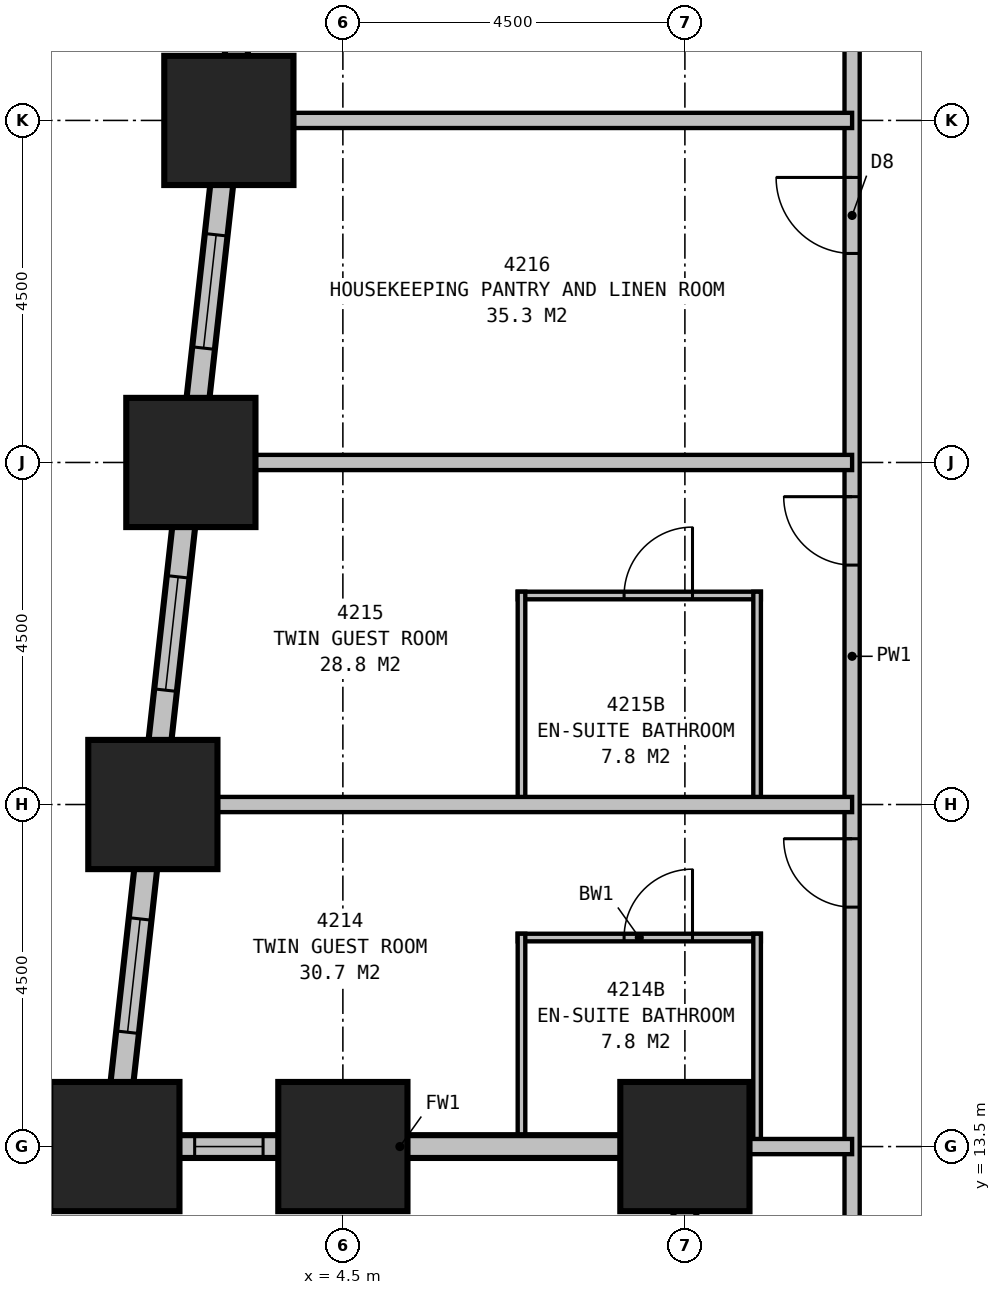
"""IFC4 building model, lengths in metres.
Left out: names, types, materials, properties, quantities, classifications, styles, units other than length and angle.
Written with IfcOpenShell. Run it as: python <this file> out.ifc"""

import sys

from ifc_helpers import new_model, si_unit, direction, frame, frame_2d, origin, origin_2d, place, context, subcontext, project, spatial, rectangle, extrude, element, fill, save


model = new_model("IFC4")
c1 = context("Model", 3, precision=1e-05, world=origin(), true_north=direction((0.0, 1.0)))
c2 = subcontext(c1, "Body", "Model", "MODEL_VIEW")
j1 = project(units=[si_unit("LENGTHUNIT", "METRE"), si_unit("PLANEANGLEUNIT", "RADIAN")], contexts=[c1])
p1 = place(None, origin())
s1 = spatial("IfcSite", under=j1, at=p1, CompositionType="ELEMENT")
p2 = place(p1, origin())
s2 = spatial("IfcBuilding", under=s1, at=p2, CompositionType="ELEMENT")
p3 = place(p2, frame((0.0, 0.0, 165.9)))
s3 = spatial("IfcBuildingStorey", under=s2, at=p3, CompositionType="ELEMENT", Elevation=165.9)
for number, where, z_axis, x_axis in (
    (1, (1.5, 13.5, 0.0), (0.0, 0.0, 1.0), (1.0, 0.0, 0.0)),
    (2, (4.5, 13.5, 0.0), (0.0, 0.0, 1.0), (1.0, 0.0, 0.0)),
    (3, (9.0, 13.5, 0.0), (0.0, 0.0, 1.0), (1.0, 0.0, 0.0)),
    (4, (3.0, 27.0, 0.0), (0.0, 0.0, 1.0), (1.0, 0.0, 0.0)),
    (5, (2.5, 22.5, 0.0), (0.0, 0.0, 1.0), (1.0, 0.0, 0.0)),
    (6, (2.0, 18.0, 0.0), (0.0, 0.0, 1.0), (1.0, 0.0, 0.0)),
):
    element("IfcColumn", number, at=place(p3, frame(where, z_axis=z_axis, x_axis=x_axis)), inside=s3, PredefinedType="COLUMN", context=c2, shape_type="SweptSolid", body=[
        extrude(rectangle(XDim=1.7, YDim=1.7, at=origin_2d()), origin(), (0.0, 0.0, 1.0), 3.5),
    ])
p4 = place(p3, frame((1.35, 13.5, 0.0), z_axis=(0.0, 0.0, 1.0), x_axis=(1.0, 0.0, 0.0)))
e7 = element("IfcWall", 7, at=p4, inside=s3, PredefinedType="STANDARD", context=c2, shape_type="SweptSolid", body=[
    extrude(rectangle(XDim=7.8, YDim=0.3, at=frame_2d((3.9, 0.0))), origin(), (0.0, 0.0, 1.0), 2.15),
])
p5 = place(p4, frame((1.2, 0.0, 0.5)))
e8 = element("IfcOpeningElement", 8, at=p5, cuts=e7, PredefinedType="OPENING", context=c2, shape_type="SweptSolid", body=[
    extrude(rectangle(XDim=0.9, YDim=1.5, at=frame_2d((0.45, 0.75))), frame((0.0, 0.16, 0.0), z_axis=(0.0, -1.0, 0.0), x_axis=(1.0, 0.0, 0.0)), (0.0, 0.0, 1.0), 0.32),
])
p6 = place(p3, frame((9.0, 13.65, 0.0), z_axis=(0.0, 0.0, 1.0), x_axis=(0.0, -1.0, 0.0)))
e9 = element("IfcWall", 9, at=p6, inside=s3, PredefinedType="STANDARD", context=c2, shape_type="SweptSolid", body=[
    extrude(rectangle(XDim=13.8, YDim=0.3, at=frame_2d((6.9, 0.0))), origin(), (0.0, 0.0, 1.0), 2.15),
])
p7 = place(p6, frame((1.2, 0.0, 0.5)))
e10 = element("IfcOpeningElement", 10, at=p7, cuts=e9, PredefinedType="OPENING", context=c2, shape_type="SweptSolid", body=[
    extrude(rectangle(XDim=2.4, YDim=1.5, at=frame_2d((1.2, 0.75))), frame((0.0, 0.16, 0.0), z_axis=(0.0, -1.0, 0.0), x_axis=(1.0, 0.0, 0.0)), (0.0, 0.0, 1.0), 0.32),
])
p8 = place(p6, frame((5.7, 0.0, 0.5)))
e11 = element("IfcOpeningElement", 11, at=p8, cuts=e9, PredefinedType="OPENING", context=c2, shape_type="SweptSolid", body=[
    extrude(rectangle(XDim=2.4, YDim=1.5, at=frame_2d((1.2, 0.75))), frame((0.0, 0.16, 0.0), z_axis=(0.0, -1.0, 0.0), x_axis=(1.0, 0.0, 0.0)), (0.0, 0.0, 1.0), 0.32),
])
p9 = place(p6, frame((10.2, 0.0, 0.5)))
e12 = element("IfcOpeningElement", 12, at=p9, cuts=e9, PredefinedType="OPENING", context=c2, shape_type="SweptSolid", body=[
    extrude(rectangle(XDim=2.4, YDim=1.5, at=frame_2d((1.2, 0.75))), frame((0.0, 0.16, 0.0), z_axis=(0.0, -1.0, 0.0), x_axis=(1.0, 0.0, 0.0)), (0.0, 0.0, 1.0), 0.32),
])
p10 = place(p3, frame((4.017, 36.149, 0.0), z_axis=(0.0, 0.0, 1.0), x_axis=(-0.110433862387, -0.993883475081, 0.0)))
e13 = element("IfcWall", 13, at=p10, inside=s3, PredefinedType="STANDARD", context=c2, shape_type="SweptSolid", body=[
    extrude(rectangle(XDim=22.939, YDim=0.3, at=frame_2d((11.469, 0.0))), origin(), (0.0, 0.0, 1.0), 2.25),
])
p11 = place(p10, frame((1.664, 0.0, 0.5)))
e14 = element("IfcOpeningElement", 14, at=p11, cuts=e13, PredefinedType="OPENING", context=c2, shape_type="SweptSolid", body=[
    extrude(rectangle(XDim=1.5, YDim=1.6, at=frame_2d((0.75, 0.8))), frame((0.0, 0.16, 0.0), z_axis=(0.0, -1.0, 0.0), x_axis=(1.0, 0.0, 0.0)), (0.0, 0.0, 1.0), 0.32),
])
p12 = place(p10, frame((6.192, 0.0, 0.5)))
e15 = element("IfcOpeningElement", 15, at=p12, cuts=e13, PredefinedType="OPENING", context=c2, shape_type="SweptSolid", body=[
    extrude(rectangle(XDim=1.5, YDim=1.6, at=frame_2d((0.75, 0.8))), frame((0.0, 0.16, 0.0), z_axis=(0.0, -1.0, 0.0), x_axis=(1.0, 0.0, 0.0)), (0.0, 0.0, 1.0), 0.32),
])
p13 = place(p10, frame((10.719, 0.0, 0.5)))
e16 = element("IfcOpeningElement", 16, at=p13, cuts=e13, PredefinedType="OPENING", context=c2, shape_type="SweptSolid", body=[
    extrude(rectangle(XDim=1.5, YDim=1.6, at=frame_2d((0.75, 0.8))), frame((0.0, 0.16, 0.0), z_axis=(0.0, -1.0, 0.0), x_axis=(1.0, 0.0, 0.0)), (0.0, 0.0, 1.0), 0.32),
])
p14 = place(p10, frame((15.247, 0.0, 0.5)))
e17 = element("IfcOpeningElement", 17, at=p14, cuts=e13, PredefinedType="OPENING", context=c2, shape_type="SweptSolid", body=[
    extrude(rectangle(XDim=1.5, YDim=1.6, at=frame_2d((0.75, 0.8))), frame((0.0, 0.16, 0.0), z_axis=(0.0, -1.0, 0.0), x_axis=(1.0, 0.0, 0.0)), (0.0, 0.0, 1.0), 0.32),
])
p15 = place(p10, frame((19.775, 0.0, 0.5)))
e18 = element("IfcOpeningElement", 18, at=p15, cuts=e13, PredefinedType="OPENING", context=c2, shape_type="SweptSolid", body=[
    extrude(rectangle(XDim=1.5, YDim=1.6, at=frame_2d((0.75, 0.8))), frame((0.0, 0.16, 0.0), z_axis=(0.0, -1.0, 0.0), x_axis=(1.0, 0.0, 0.0)), (0.0, 0.0, 1.0), 0.32),
])
p16 = place(p3, frame((11.2, 10.6, 0.0), z_axis=(0.0, 0.0, 1.0), x_axis=(0.0, 1.0, 0.0)))
e19 = element("IfcWall", 19, at=p16, inside=s3, PredefinedType="PARTITIONING", context=c2, shape_type="SweptSolid", body=[
    extrude(rectangle(XDim=18.7, YDim=0.2, at=frame_2d((9.35, 0.0))), origin(), (0.0, 0.0, 1.0), 3.25),
])
p17 = place(p16, frame((6.05, 0.0, 0.0)))
e20 = element("IfcOpeningElement", 20, at=p17, cuts=e19, PredefinedType="OPENING", context=c2, shape_type="SweptSolid", body=[
    extrude(rectangle(XDim=0.9, YDim=2.1, at=frame_2d((0.45, 1.05))), frame((0.0, 0.11, 0.0), z_axis=(0.0, -1.0, 0.0), x_axis=(1.0, 0.0, 0.0)), (0.0, 0.0, 1.0), 0.22),
])
p18 = place(p16, frame((10.55, 0.0, 0.0)))
e21 = element("IfcOpeningElement", 21, at=p18, cuts=e19, PredefinedType="OPENING", context=c2, shape_type="SweptSolid", body=[
    extrude(rectangle(XDim=0.9, YDim=2.1, at=frame_2d((0.45, 1.05))), frame((0.0, 0.11, 0.0), z_axis=(0.0, -1.0, 0.0), x_axis=(1.0, 0.0, 0.0)), (0.0, 0.0, 1.0), 0.22),
])
p19 = place(p16, frame((14.65, 0.0, 0.0)))
e22 = element("IfcOpeningElement", 22, at=p19, cuts=e19, PredefinedType="OPENING", context=c2, shape_type="SweptSolid", body=[
    extrude(rectangle(XDim=1.0, YDim=2.1, at=frame_2d((0.5, 1.05))), frame((0.0, 0.11, 0.0), z_axis=(0.0, -1.0, 0.0), x_axis=(1.0, 0.0, 0.0)), (0.0, 0.0, 1.0), 0.22),
])
p20 = place(p3, frame((11.2, 18.0, 0.0), z_axis=(0.0, 0.0, 1.0), x_axis=(-1.0, 0.0, 0.0)))
e23 = element("IfcWall", 23, at=p20, inside=s3, PredefinedType="PARTITIONING", context=c2, shape_type="SweptSolid", body=[
    extrude(rectangle(XDim=9.199, YDim=0.2, at=frame_2d((4.6, 0.0))), origin(), (0.0, 0.0, 1.0), 2.25),
])
p21 = place(p3, frame((11.2, 22.5, 0.0), z_axis=(0.0, 0.0, 1.0), x_axis=(-1.0, 0.0, 0.0)))
e24 = element("IfcWall", 24, at=p21, inside=s3, PredefinedType="PARTITIONING", context=c2, shape_type="SweptSolid", body=[
    extrude(rectangle(XDim=8.699, YDim=0.2, at=frame_2d((4.35, 0.0))), origin(), (0.0, 0.0, 1.0), 2.25),
])
for number, where, z_axis, x_axis in (
    (25, (9.95, 13.5, 0.0), (0.0, 0.0, 1.0), (0.0, 1.0, 0.0)),
    (26, (6.85, 13.5, 0.0), (0.0, 0.0, 1.0), (0.0, 1.0, 0.0)),
):
    element("IfcWall", number, at=place(p3, frame(where, z_axis=z_axis, x_axis=x_axis)), inside=s3, PredefinedType="PLUMBINGWALL", context=c2, shape_type="SweptSolid", body=[
        extrude(rectangle(XDim=2.8, YDim=0.1, at=frame_2d((1.4, 0.0))), origin(), (0.0, 0.0, 1.0), 3.25),
    ])
p22 = place(p3, frame((10.0, 16.25, 0.0), z_axis=(0.0, 0.0, 1.0), x_axis=(-1.0, 0.0, 0.0)))
e27 = element("IfcWall", 27, at=p22, inside=s3, PredefinedType="PLUMBINGWALL", context=c2, shape_type="SweptSolid", body=[
    extrude(rectangle(XDim=3.2, YDim=0.1, at=frame_2d((1.6, 0.0))), origin(), (0.0, 0.0, 1.0), 3.25),
])
p23 = place(p22, frame((1.8, 0.0, 0.0), z_axis=(0.0, 0.0, 1.0), x_axis=(-1.0, 0.0, 0.0)))
e28 = element("IfcOpeningElement", 28, at=p23, cuts=e27, PredefinedType="OPENING", context=c2, shape_type="SweptSolid", body=[
    extrude(rectangle(XDim=0.9, YDim=2.1, at=frame_2d((0.45, 1.05))), frame((0.0, 0.06, 0.0), z_axis=(0.0, -1.0, 0.0), x_axis=(1.0, 0.0, 0.0)), (0.0, 0.0, 1.0), 0.12),
])
for number, where, z_axis, x_axis in (
    (29, (9.95, 18.0, 0.0), (0.0, 0.0, 1.0), (0.0, 1.0, 0.0)),
    (30, (6.85, 18.0, 0.0), (0.0, 0.0, 1.0), (0.0, 1.0, 0.0)),
):
    element("IfcWall", number, at=place(p3, frame(where, z_axis=z_axis, x_axis=x_axis)), inside=s3, PredefinedType="PLUMBINGWALL", context=c2, shape_type="SweptSolid", body=[
        extrude(rectangle(XDim=2.8, YDim=0.1, at=frame_2d((1.4, 0.0))), origin(), (0.0, 0.0, 1.0), 3.25),
    ])
p24 = place(p3, frame((10.0, 20.75, 0.0), z_axis=(0.0, 0.0, 1.0), x_axis=(-1.0, 0.0, 0.0)))
e31 = element("IfcWall", 31, at=p24, inside=s3, PredefinedType="PLUMBINGWALL", context=c2, shape_type="SweptSolid", body=[
    extrude(rectangle(XDim=3.2, YDim=0.1, at=frame_2d((1.6, 0.0))), origin(), (0.0, 0.0, 1.0), 3.25),
])
p25 = place(p24, frame((1.8, 0.0, 0.0), z_axis=(0.0, 0.0, 1.0), x_axis=(-1.0, 0.0, 0.0)))
e32 = element("IfcOpeningElement", 32, at=p25, cuts=e31, PredefinedType="OPENING", context=c2, shape_type="SweptSolid", body=[
    extrude(rectangle(XDim=0.9, YDim=2.1, at=frame_2d((0.45, 1.05))), frame((0.0, 0.06, 0.0), z_axis=(0.0, -1.0, 0.0), x_axis=(1.0, 0.0, 0.0)), (0.0, 0.0, 1.0), 0.12),
])
p26 = place(p3, frame((11.2, 13.5, 0.0), z_axis=(0.0, 0.0, 1.0), x_axis=(-1.0, 0.0, 0.0)))
e33 = element("IfcWall", 33, at=p26, inside=s3, PredefinedType="PARTITIONING", context=c2, shape_type="SweptSolid", body=[
    extrude(rectangle(XDim=2.2, YDim=0.2, at=frame_2d((1.1, 0.0))), origin(), (0.0, 0.0, 1.0), 1.95),
])
p27 = place(p3, frame((11.2, 27.0, 0.0), z_axis=(0.0, 0.0, 1.0), x_axis=(-1.0, 0.0, 0.0)))
e34 = element("IfcWall", 34, at=p27, inside=s3, PredefinedType="PARTITIONING", context=c2, shape_type="SweptSolid", body=[
    extrude(rectangle(XDim=7.977, YDim=0.2, at=frame_2d((3.988, 0.0))), origin(), (0.0, 0.0, 1.0), 1.95),
])
p28 = place(p5, origin())
e35 = element("IfcWindow", 35, at=p28, inside=s3, PartitioningType="SINGLE_PANEL", PredefinedType="WINDOW", context=c2, shape_type="SweptSolid", body=[
    extrude(rectangle(XDim=0.9, YDim=1.5, at=frame_2d((0.45, 0.75))), frame((0.0, 0.03, 0.0), z_axis=(0.0, -1.0, 0.0), x_axis=(1.0, 0.0, 0.0)), (0.0, 0.0, 1.0), 0.06),
])
fill(e8, e35)
p29 = place(p13, origin())
e36 = element("IfcWindow", 36, at=p29, inside=s3, PartitioningType="SINGLE_PANEL", PredefinedType="WINDOW", context=c2, shape_type="SweptSolid", body=[
    extrude(rectangle(XDim=1.5, YDim=1.6, at=frame_2d((0.75, 0.8))), frame((0.0, 0.03, 0.0), z_axis=(0.0, -1.0, 0.0), x_axis=(1.0, 0.0, 0.0)), (0.0, 0.0, 1.0), 0.06),
])
fill(e16, e36)
p30 = place(p14, origin())
e37 = element("IfcWindow", 37, at=p30, inside=s3, PartitioningType="SINGLE_PANEL", PredefinedType="WINDOW", context=c2, shape_type="SweptSolid", body=[
    extrude(rectangle(XDim=1.5, YDim=1.6, at=frame_2d((0.75, 0.8))), frame((0.0, 0.03, 0.0), z_axis=(0.0, -1.0, 0.0), x_axis=(1.0, 0.0, 0.0)), (0.0, 0.0, 1.0), 0.06),
])
fill(e17, e37)
p31 = place(p15, origin())
e38 = element("IfcWindow", 38, at=p31, inside=s3, PartitioningType="SINGLE_PANEL", PredefinedType="WINDOW", context=c2, shape_type="SweptSolid", body=[
    extrude(rectangle(XDim=1.5, YDim=1.6, at=frame_2d((0.75, 0.8))), frame((0.0, 0.03, 0.0), z_axis=(0.0, -1.0, 0.0), x_axis=(1.0, 0.0, 0.0)), (0.0, 0.0, 1.0), 0.06),
])
fill(e18, e38)
p32 = place(p17, origin())
e39 = element("IfcDoor", 39, at=p32, inside=s3, OperationType="SINGLE_SWING_RIGHT", PredefinedType="DOOR", context=c2, shape_type="SweptSolid", body=[
    extrude(rectangle(XDim=0.9, YDim=2.1, at=frame_2d((0.45, 1.05))), frame((0.0, 0.025, 0.0), z_axis=(0.0, -1.0, 0.0), x_axis=(1.0, 0.0, 0.0)), (0.0, 0.0, 1.0), 0.05),
])
fill(e20, e39)
p33 = place(p18, origin())
e40 = element("IfcDoor", 40, at=p33, inside=s3, OperationType="SINGLE_SWING_RIGHT", PredefinedType="DOOR", context=c2, shape_type="SweptSolid", body=[
    extrude(rectangle(XDim=0.9, YDim=2.1, at=frame_2d((0.45, 1.05))), frame((0.0, 0.025, 0.0), z_axis=(0.0, -1.0, 0.0), x_axis=(1.0, 0.0, 0.0)), (0.0, 0.0, 1.0), 0.05),
])
fill(e21, e40)
p34 = place(p19, origin())
e41 = element("IfcDoor", 41, at=p34, inside=s3, OperationType="SINGLE_SWING_RIGHT", PredefinedType="DOOR", context=c2, shape_type="SweptSolid", body=[
    extrude(rectangle(XDim=1.0, YDim=2.1, at=frame_2d((0.5, 1.05))), frame((0.0, 0.025, 0.0), z_axis=(0.0, -1.0, 0.0), x_axis=(1.0, 0.0, 0.0)), (0.0, 0.0, 1.0), 0.05),
])
fill(e22, e41)
p35 = place(p23, origin())
e42 = element("IfcDoor", 42, at=p35, inside=s3, OperationType="SINGLE_SWING_RIGHT", PredefinedType="DOOR", context=c2, shape_type="SweptSolid", body=[
    extrude(rectangle(XDim=0.9, YDim=2.1, at=frame_2d((0.45, 1.05))), frame((0.0, 0.025, 0.0), z_axis=(0.0, -1.0, 0.0), x_axis=(1.0, 0.0, 0.0)), (0.0, 0.0, 1.0), 0.05),
])
fill(e28, e42)
p36 = place(p25, origin())
e43 = element("IfcDoor", 43, at=p36, inside=s3, OperationType="SINGLE_SWING_RIGHT", PredefinedType="DOOR", context=c2, shape_type="SweptSolid", body=[
    extrude(rectangle(XDim=0.9, YDim=2.1, at=frame_2d((0.45, 1.05))), frame((0.0, 0.025, 0.0), z_axis=(0.0, -1.0, 0.0), x_axis=(1.0, 0.0, 0.0)), (0.0, 0.0, 1.0), 0.05),
])
fill(e32, e43)
save(model, sys.argv[1])
